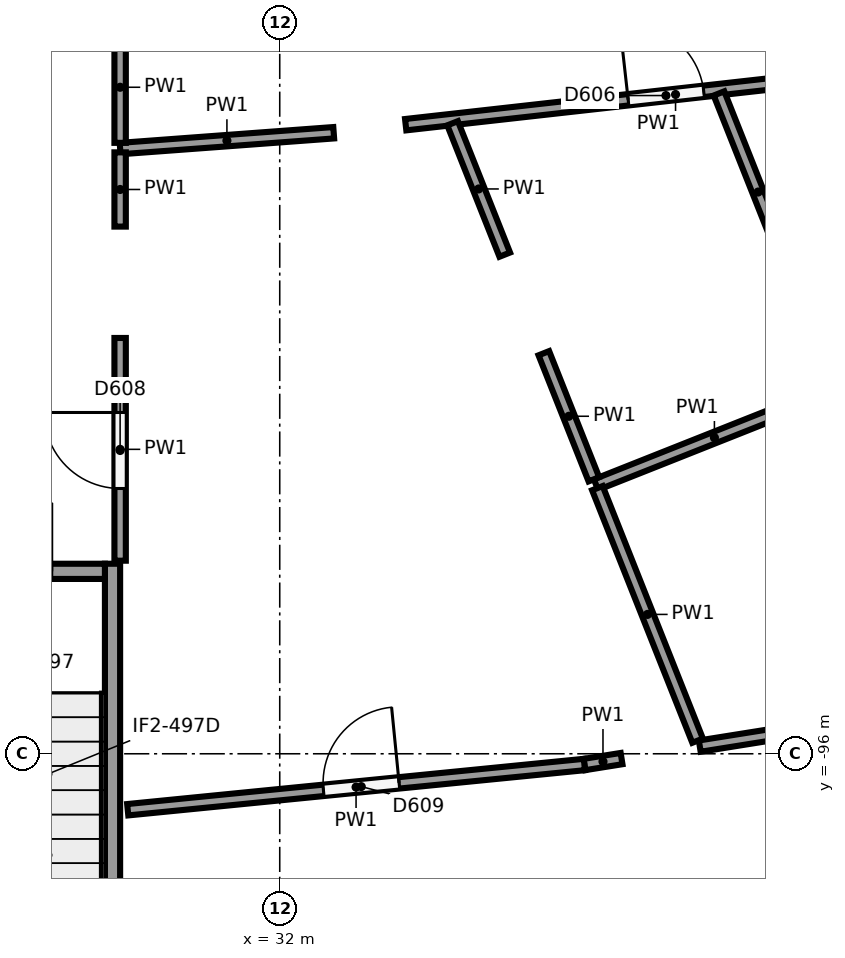
"""IFC4 building model, lengths in metres.
Left out: names, types, materials, properties, quantities, classifications, styles, units other than length and angle.
Written with IfcOpenShell. Run it as: python <this file> out.ifc"""

import sys

from ifc_helpers import new_model, si_unit, direction, frame, frame_2d, origin, origin_2d, place, context, subcontext, project, spatial, rectangle, circle, extrude, element, fill, save


model = new_model("IFC4")
c1 = context("Model", 3, precision=1e-05, world=origin(), true_north=direction((0.0, 1.0)))
c2 = subcontext(c1, "Body", "Model", "MODEL_VIEW")
j1 = project(units=[si_unit("LENGTHUNIT", "METRE"), si_unit("PLANEANGLEUNIT", "RADIAN")], contexts=[c1])
p1 = place(None, origin())
s1 = spatial("IfcSite", under=j1, at=p1, CompositionType="ELEMENT")
p2 = place(p1, origin())
s2 = spatial("IfcBuilding", under=s1, at=p2, CompositionType="ELEMENT")
p3 = place(p2, origin())
s3 = spatial("IfcBuildingStorey", under=s2, at=p3, CompositionType="ELEMENT", Elevation=0.0)
p4 = place(p3, frame((34.531, -89.912, 0.0), z_axis=(0.0, 0.0, 1.0), x_axis=(1.0, 0.0, 0.0)))
e1 = element("IfcColumn", 1, at=p4, inside=s3, PredefinedType="COLUMN", context=c2, shape_type="SweptSolid", body=[
    extrude(circle(Radius=0.45, at=origin_2d()), origin(), (0.0, 0.0, 1.0), 6.5),
])
p5 = place(p3, frame((29.8, -102.3, 0.0), z_axis=(0.0, 0.0, 1.0), x_axis=(0.0, 1.0, 0.0)))
e2 = element("IfcWall", 2, at=p5, inside=s3, PredefinedType="SHEAR", context=c2, shape_type="SweptSolid", body=[
    extrude(rectangle(XDim=8.8, YDim=0.2, at=frame_2d((4.4, 0.0))), origin(), (0.0, 0.0, 1.0), 6.15),
])
p6 = place(p3, frame((26.5, -93.6, 0.0), z_axis=(0.0, 0.0, 1.0), x_axis=(1.0, 0.0, 0.0)))
e3 = element("IfcWall", 3, at=p6, inside=s3, PredefinedType="SHEAR", context=c2, shape_type="SweptSolid", body=[
    extrude(rectangle(XDim=3.2, YDim=0.2, at=frame_2d((1.6, 0.0))), origin(), (0.0, 0.0, 1.0), 6.15),
])
p7 = place(p6, frame((0.7, 0.0, 0.0)))
e4 = element("IfcOpeningElement", 4, at=p7, cuts=e3, PredefinedType="OPENING", context=c2, shape_type="SweptSolid", body=[
    extrude(rectangle(XDim=1.8, YDim=2.1, at=frame_2d((0.9, 1.05))), frame((0.0, 0.11, 0.0), z_axis=(0.0, -1.0, 0.0), x_axis=(1.0, 0.0, 0.0)), (0.0, 0.0, 1.0), 0.22),
])
p8 = place(p3, frame((33.657, -87.724, 0.0), z_axis=(0.0, 0.0, 1.0), x_axis=(0.993792986052, 0.111245228541, 0.0)))
e5 = element("IfcWall", 5, at=p8, inside=s3, PredefinedType="PARTITIONING", context=c2, shape_type="SweptSolid", body=[
    extrude(rectangle(XDim=7.146, YDim=0.15, at=frame_2d((3.573, 0.0))), origin(), (0.0, 0.0, 1.0), 6.15),
])
p9 = place(p8, frame((2.946, 0.0, 0.0)))
e6 = element("IfcOpeningElement", 6, at=p9, cuts=e5, PredefinedType="OPENING", context=c2, shape_type="SweptSolid", body=[
    extrude(rectangle(XDim=1.0, YDim=2.1, at=frame_2d((0.5, 1.05))), frame((0.0, 0.085, 0.0), z_axis=(0.0, -1.0, 0.0), x_axis=(1.0, 0.0, 0.0)), (0.0, 0.0, 1.0), 0.17),
])
p10 = place(p3, frame((32.71, -87.83, 0.0), z_axis=(0.0, 0.0, 1.0), x_axis=(-0.997265626559, -0.07390040652, 0.0)))
e7 = element("IfcWall", 7, at=p10, inside=s3, PredefinedType="PARTITIONING", context=c2, shape_type="SweptSolid", body=[
    extrude(rectangle(XDim=2.818, YDim=0.15, at=frame_2d((1.409, 0.0))), origin(), (0.0, 0.0, 1.0), 6.15),
])
p11 = place(p3, frame((29.9, -87.963, 0.0), z_axis=(0.0, 0.0, 1.0), x_axis=(0.0, 1.0, 0.0)))
e8 = element("IfcWall", 8, at=p11, inside=s3, PredefinedType="PARTITIONING", context=c2, shape_type="SweptSolid", body=[
    extrude(rectangle(XDim=1.463, YDim=0.15, at=frame_2d((0.731, 0.0))), origin(), (0.0, 0.0, 1.0), 6.15),
])
p12 = place(p3, frame((38.809, -89.907, 0.0), z_axis=(0.0, 0.0, 1.0), x_axis=(-0.368870710823, 0.929480714537, 0.0)))
e9 = element("IfcWall", 9, at=p12, inside=s3, PredefinedType="PARTITIONING", context=c2, shape_type="SweptSolid", body=[
    extrude(rectangle(XDim=2.791, YDim=0.15, at=frame_2d((1.396, 0.0))), origin(), (0.0, 0.0, 1.0), 6.15),
])
p13 = place(p3, frame((39.277, -91.222, 0.0), z_axis=(0.0, 0.0, 1.0), x_axis=(-0.929492692584, -0.368840527103, 0.0)))
e10 = element("IfcWall", 10, at=p13, inside=s3, PredefinedType="PARTITIONING", context=c2, shape_type="SweptSolid", body=[
    extrude(rectangle(XDim=3.353, YDim=0.15, at=frame_2d((1.676, 0.0))), origin(), (0.0, 0.0, 1.0), 6.15),
])
p14 = place(p3, frame((36.133, -92.389, 0.0), z_axis=(0.0, 0.0, 1.0), x_axis=(-0.368794869891, 0.929510808943, 0.0)))
e11 = element("IfcWall", 11, at=p14, inside=s3, PredefinedType="PARTITIONING", context=c2, shape_type="SweptSolid", body=[
    extrude(rectangle(XDim=1.785, YDim=0.15, at=frame_2d((0.892, 0.0))), origin(), (0.0, 0.0, 1.0), 6.15),
])
p15 = place(p3, frame((34.96, -89.434, 0.0), z_axis=(0.0, 0.0, 1.0), x_axis=(-0.368854520824, 0.929487139485, 0.0)))
e12 = element("IfcWall", 12, at=p15, inside=s3, PredefinedType="PARTITIONING", context=c2, shape_type="SweptSolid", body=[
    extrude(rectangle(XDim=1.86, YDim=0.15, at=frame_2d((0.93, 0.0))), origin(), (0.0, 0.0, 1.0), 6.15),
])
p16 = place(p3, frame((44.011, -94.865, 0.0), z_axis=(0.0, 0.0, 1.0), x_axis=(-0.98752031679, -0.157491663037, 0.0)))
e13 = element("IfcWall", 13, at=p16, inside=s3, PredefinedType="PARTITIONING", context=c2, shape_type="SweptSolid", body=[
    extrude(rectangle(XDim=6.567, YDim=0.15, at=frame_2d((3.283, 0.0))), origin(), (0.0, 0.0, 1.0), 6.15),
])
p17 = place(p16, frame((2.7, 0.0, 0.0)))
e14 = element("IfcOpeningElement", 14, at=p17, cuts=e13, PredefinedType="OPENING", context=c2, shape_type="SweptSolid", body=[
    extrude(rectangle(XDim=1.0, YDim=2.1, at=frame_2d((0.5, 1.05))), frame((0.0, 0.085, 0.0), z_axis=(0.0, -1.0, 0.0), x_axis=(1.0, 0.0, 0.0)), (0.0, 0.0, 1.0), 0.17),
])
p18 = place(p3, frame((37.498, -95.828, 0.0), z_axis=(0.0, 0.0, 1.0), x_axis=(-0.368822104186, 0.929500002939, 0.0)))
e15 = element("IfcWall", 15, at=p18, inside=s3, PredefinedType="PARTITIONING", context=c2, shape_type="SweptSolid", body=[
    extrude(rectangle(XDim=3.574, YDim=0.15, at=frame_2d((1.787, 0.0))), origin(), (0.0, 0.0, 1.0), 6.15),
])
p19 = place(p3, frame((29.9, -93.46, 0.0), z_axis=(0.0, 0.0, 1.0), x_axis=(0.0, 1.0, 0.0)))
e16 = element("IfcWall", 16, at=p19, inside=s3, PredefinedType="PARTITIONING", context=c2, shape_type="SweptSolid", body=[
    extrude(rectangle(XDim=2.93, YDim=0.15, at=frame_2d((1.465, 0.0))), origin(), (0.0, 0.0, 1.0), 6.15),
])
p20 = place(p19, frame((0.95, 0.0, 0.0)))
e17 = element("IfcOpeningElement", 17, at=p20, cuts=e16, PredefinedType="OPENING", context=c2, shape_type="SweptSolid", body=[
    extrude(rectangle(XDim=1.0, YDim=2.1, at=frame_2d((0.5, 1.05))), frame((0.0, 0.085, 0.0), z_axis=(0.0, -1.0, 0.0), x_axis=(1.0, 0.0, 0.0)), (0.0, 0.0, 1.0), 0.17),
])
p21 = place(p3, frame((29.9, -89.064, 0.0), z_axis=(0.0, 0.0, 1.0), x_axis=(0.0, 1.0, 0.0)))
e18 = element("IfcWall", 18, at=p21, inside=s3, PredefinedType="PARTITIONING", context=c2, shape_type="SweptSolid", body=[
    extrude(rectangle(XDim=0.977, YDim=0.15, at=frame_2d((0.488, 0.0))), origin(), (0.0, 0.0, 1.0), 6.15),
])
p22 = place(p3, frame((36.498, -96.063, 0.0), z_axis=(0.0, 0.0, 1.0), x_axis=(-0.987477522221, -0.157759763909, 0.0)))
e19 = element("IfcWall", 19, at=p22, inside=s3, PredefinedType="PARTITIONING", context=c2, shape_type="SweptSolid", body=[
    extrude(rectangle(XDim=0.495, YDim=0.15, at=frame_2d((0.248, 0.0))), origin(), (0.0, 0.0, 1.0), 6.15),
])
p23 = place(p3, frame((30.0, -96.736, 0.0), z_axis=(0.0, 0.0, 1.0), x_axis=(0.995133204742, 0.098538849293, 0.0)))
e20 = element("IfcWall", 20, at=p23, inside=s3, PredefinedType="PARTITIONING", context=c2, shape_type="SweptSolid", body=[
    extrude(rectangle(XDim=6.038, YDim=0.15, at=frame_2d((3.019, 0.0))), origin(), (0.0, 0.0, 1.0), 6.15),
])
p24 = place(p23, frame((2.588, 0.0, 0.0)))
e21 = element("IfcOpeningElement", 21, at=p24, cuts=e20, PredefinedType="OPENING", context=c2, shape_type="SweptSolid", body=[
    extrude(rectangle(XDim=1.0, YDim=2.1, at=frame_2d((0.5, 1.05))), frame((0.0, 0.085, 0.0), z_axis=(0.0, -1.0, 0.0), x_axis=(1.0, 0.0, 0.0)), (0.0, 0.0, 1.0), 0.17),
])
p25 = place(p9, origin())
e22 = element("IfcDoor", 22, at=p25, inside=s3, OperationType="SINGLE_SWING_LEFT", PredefinedType="DOOR", context=c2, shape_type="SweptSolid", body=[
    extrude(rectangle(XDim=1.0, YDim=2.1, at=frame_2d((0.5, 1.05))), frame((0.0, 0.025, 0.0), z_axis=(0.0, -1.0, 0.0), x_axis=(1.0, 0.0, 0.0)), (0.0, 0.0, 1.0), 0.05),
])
fill(e6, e22)
p26 = place(p20, origin())
e23 = element("IfcDoor", 23, at=p26, inside=s3, OperationType="SINGLE_SWING_RIGHT", PredefinedType="DOOR", context=c2, shape_type="SweptSolid", body=[
    extrude(rectangle(XDim=1.0, YDim=2.1, at=frame_2d((0.5, 1.05))), frame((0.0, 0.025, 0.0), z_axis=(0.0, -1.0, 0.0), x_axis=(1.0, 0.0, 0.0)), (0.0, 0.0, 1.0), 0.05),
])
fill(e17, e23)
p27 = place(p24, origin())
e24 = element("IfcDoor", 24, at=p27, inside=s3, OperationType="SINGLE_SWING_RIGHT", PredefinedType="DOOR", context=c2, shape_type="SweptSolid", body=[
    extrude(rectangle(XDim=1.0, YDim=2.1, at=frame_2d((0.5, 1.05))), frame((0.0, 0.025, 0.0), z_axis=(0.0, -1.0, 0.0), x_axis=(1.0, 0.0, 0.0)), (0.0, 0.0, 1.0), 0.05),
])
fill(e21, e24)
save(model, sys.argv[1])
